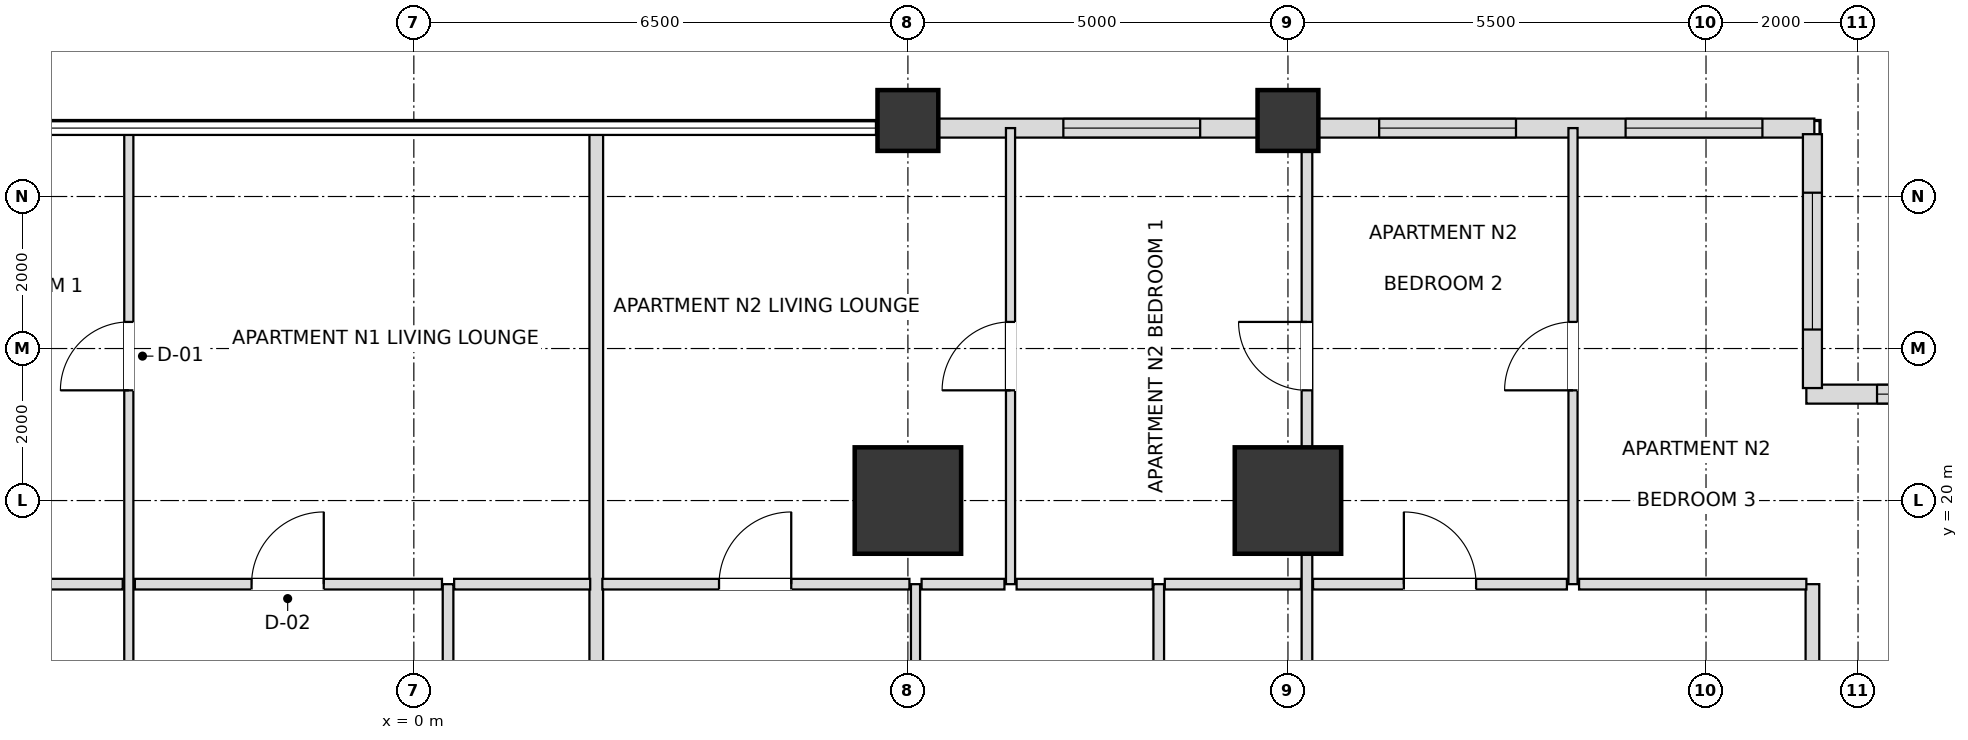
"""IFC4 building model, lengths in metres.
Left out: names, types, materials, properties, quantities, classifications, styles, units other than length and angle.
Written with IfcOpenShell. Run it as: python <this file> out.ifc"""

import sys

from ifc_helpers import new_model, si_unit, direction, frame, frame_2d, origin, origin_2d, place, context, subcontext, project, spatial, rectangle, extrude, element, fill, save


model = new_model("IFC4")
c1 = context("Model", 3, precision=1e-05, world=origin(), true_north=direction((0.0, 1.0)))
c2 = subcontext(c1, "Body", "Model", "MODEL_VIEW")
j1 = project(units=[si_unit("LENGTHUNIT", "METRE"), si_unit("PLANEANGLEUNIT", "RADIAN")], contexts=[c1])
p1 = place(None, origin())
s1 = spatial("IfcSite", under=j1, at=p1, CompositionType="ELEMENT")
p2 = place(p1, origin())
s2 = spatial("IfcBuilding", under=s1, at=p2, CompositionType="ELEMENT")
p3 = place(p2, frame((0.0, 0.0, 64.8)))
s3 = spatial("IfcBuildingStorey", under=s2, at=p3, CompositionType="ELEMENT", Elevation=64.8)
for number, where, z_axis, x_axis in (
    (1, (11.5, 20.0, 0.0), (0.0, 0.0, 1.0), (1.0, 0.0, 0.0)),
    (2, (6.5, 20.0, 0.0), (0.0, 0.0, 1.0), (1.0, 0.0, 0.0)),
):
    element("IfcColumn", number, at=place(p3, frame(where, z_axis=z_axis, x_axis=x_axis)), inside=s3, PredefinedType="USERDEFINED", context=c2, shape_type="SweptSolid", body=[
        extrude(rectangle(XDim=1.4, YDim=1.4, at=origin_2d()), origin(), (0.0, 0.0, 1.0), 3.6),
    ])
for number, where, z_axis, x_axis in (
    (3, (6.5, 25.0, 0.0), (0.0, 0.0, 1.0), (1.0, 0.0, 0.0)),
    (4, (11.5, 25.0, 0.0), (0.0, 0.0, 1.0), (1.0, 0.0, 0.0)),
):
    element("IfcColumn", number, at=place(p3, frame(where, z_axis=z_axis, x_axis=x_axis)), inside=s3, PredefinedType="COLUMN", context=c2, shape_type="SweptSolid", body=[
        extrude(rectangle(XDim=0.8, YDim=0.8, at=origin_2d()), origin(), (0.0, 0.0, 1.0), 3.6),
    ])
p4 = place(p3, frame((18.425, 24.9, 0.0), z_axis=(0.0, 0.0, 1.0), x_axis=(-1.0, 0.0, 0.0)))
e5 = element("IfcWall", 5, at=p4, inside=s3, PredefinedType="SOLIDWALL", context=c2, shape_type="SweptSolid", body=[
    extrude(rectangle(XDim=6.53, YDim=0.25, at=frame_2d((3.265, 0.0))), origin(), (0.0, 0.0, 1.0), 2.736),
])
p5 = place(p4, frame((0.683, 0.0, 0.72)))
e6 = element("IfcOpeningElement", 6, at=p5, cuts=e5, PredefinedType="OPENING", context=c2, shape_type="SweptSolid", body=[
    extrude(rectangle(XDim=1.8, YDim=1.68, at=frame_2d((0.9, 0.84))), frame((0.0, 0.135, 0.0), z_axis=(0.0, -1.0, 0.0), x_axis=(1.0, 0.0, 0.0)), (0.0, 0.0, 1.0), 0.27),
])
p6 = place(p4, frame((3.925, 0.0, 0.72)))
e7 = element("IfcOpeningElement", 7, at=p6, cuts=e5, PredefinedType="OPENING", context=c2, shape_type="SweptSolid", body=[
    extrude(rectangle(XDim=1.8, YDim=1.68, at=frame_2d((0.9, 0.84))), frame((0.0, 0.135, 0.0), z_axis=(0.0, -1.0, 0.0), x_axis=(1.0, 0.0, 0.0)), (0.0, 0.0, 1.0), 0.27),
])
p7 = place(p3, frame((11.105, 24.9, 0.0), z_axis=(0.0, 0.0, 1.0), x_axis=(-1.0, 0.0, 0.0)))
e8 = element("IfcWall", 8, at=p7, inside=s3, PredefinedType="SOLIDWALL", context=c2, shape_type="SweptSolid", body=[
    extrude(rectangle(XDim=4.21, YDim=0.25, at=frame_2d((2.105, 0.0))), origin(), (0.0, 0.0, 1.0), 2.736),
])
p8 = place(p7, frame((0.76, 0.0, 0.72)))
e9 = element("IfcOpeningElement", 9, at=p8, cuts=e8, PredefinedType="OPENING", context=c2, shape_type="SweptSolid", body=[
    extrude(rectangle(XDim=1.8, YDim=1.68, at=frame_2d((0.9, 0.84))), frame((0.0, 0.135, 0.0), z_axis=(0.0, -1.0, 0.0), x_axis=(1.0, 0.0, 0.0)), (0.0, 0.0, 1.0), 0.27),
])
p9 = place(p3, frame((21.98, 21.4, 0.0), z_axis=(0.0, 0.0, 1.0), x_axis=(-1.0, 0.0, 0.0)))
e10 = element("IfcWall", 10, at=p9, inside=s3, PredefinedType="SOLIDWALL", context=c2, shape_type="SweptSolid", body=[
    extrude(rectangle(XDim=3.66, YDim=0.25, at=frame_2d((1.83, 0.0))), origin(), (0.0, 0.0, 1.0), 2.736),
])
p10 = place(p9, frame((0.93, 0.0, 0.72)))
e11 = element("IfcOpeningElement", 11, at=p10, cuts=e10, PredefinedType="OPENING", context=c2, shape_type="SweptSolid", body=[
    extrude(rectangle(XDim=1.8, YDim=1.68, at=frame_2d((0.9, 0.84))), frame((0.0, 0.135, 0.0), z_axis=(0.0, -1.0, 0.0), x_axis=(1.0, 0.0, 0.0)), (0.0, 0.0, 1.0), 0.27),
])
p11 = place(p3, frame((18.4, 21.48, 0.0), z_axis=(0.0, 0.0, 1.0), x_axis=(0.0, 1.0, 0.0)))
e12 = element("IfcWall", 12, at=p11, inside=s3, PredefinedType="SOLIDWALL", context=c2, shape_type="SweptSolid", body=[
    extrude(rectangle(XDim=3.34, YDim=0.25, at=frame_2d((1.67, 0.0))), origin(), (0.0, 0.0, 1.0), 2.736),
])
p12 = place(p11, frame((0.77, 0.0, 0.72)))
e13 = element("IfcOpeningElement", 13, at=p12, cuts=e12, PredefinedType="OPENING", context=c2, shape_type="SweptSolid", body=[
    extrude(rectangle(XDim=1.8, YDim=1.68, at=frame_2d((0.9, 0.84))), frame((0.0, 0.135, 0.0), z_axis=(0.0, -1.0, 0.0), x_axis=(1.0, 0.0, 0.0)), (0.0, 0.0, 1.0), 0.27),
])
p13 = place(p3, frame((-3.75, 9.3, 0.0), z_axis=(0.0, 0.0, 1.0), x_axis=(0.0, 1.0, 0.0)))
e14 = element("IfcWall", 14, at=p13, inside=s3, PredefinedType="PARTITIONING", context=c2, shape_type="SweptSolid", body=[
    extrude(rectangle(XDim=15.6, YDim=0.12, at=frame_2d((7.8, 0.0))), origin(), (0.0, 0.0, 1.0), 2.816),
])
p14 = place(p13, frame((4.325, 0.0, 0.0)))
e15 = element("IfcOpeningElement", 15, at=p14, cuts=e14, PredefinedType="OPENING", context=c2, shape_type="SweptSolid", body=[
    extrude(rectangle(XDim=0.95, YDim=2.1, at=frame_2d((0.475, 1.05))), frame((0.0, 0.07, 0.0), z_axis=(0.0, -1.0, 0.0), x_axis=(1.0, 0.0, 0.0)), (0.0, 0.0, 1.0), 0.14),
])
p15 = place(p13, frame((12.15, 0.0, 0.0)))
e16 = element("IfcOpeningElement", 16, at=p15, cuts=e14, PredefinedType="OPENING", context=c2, shape_type="SweptSolid", body=[
    extrude(rectangle(XDim=0.9, YDim=2.1, at=frame_2d((0.45, 1.05))), frame((0.0, 0.07, 0.0), z_axis=(0.0, -1.0, 0.0), x_axis=(1.0, 0.0, 0.0)), (0.0, 0.0, 1.0), 0.14),
])
p16 = place(p3, frame((0.45, 9.3, 0.0), z_axis=(0.0, 0.0, 1.0), x_axis=(0.0, 1.0, 0.0)))
e17 = element("IfcWall", 17, at=p16, inside=s3, PredefinedType="PARTITIONING", context=c2, shape_type="SweptSolid", body=[
    extrude(rectangle(XDim=9.6, YDim=0.14, at=frame_2d((4.8, 0.0))), origin(), (0.0, 0.0, 1.0), 2.948),
])
p17 = place(p16, frame((4.35, 0.0, 0.0)))
e18 = element("IfcOpeningElement", 18, at=p17, cuts=e17, PredefinedType="OPENING", context=c2, shape_type="SweptSolid", body=[
    extrude(rectangle(XDim=0.9, YDim=2.1, at=frame_2d((0.45, 1.05))), frame((0.0, 0.08, 0.0), z_axis=(0.0, -1.0, 0.0), x_axis=(1.0, 0.0, 0.0)), (0.0, 0.0, 1.0), 0.16),
])
p18 = place(p3, frame((2.4, 9.3, 0.0), z_axis=(0.0, 0.0, 1.0), x_axis=(0.0, 1.0, 0.0)))
e19 = element("IfcWall", 19, at=p18, inside=s3, PredefinedType="PARTITIONING", context=c2, shape_type="SweptSolid", body=[
    extrude(rectangle(XDim=15.6, YDim=0.18, at=frame_2d((7.8, 0.0))), origin(), (0.0, 0.0, 1.0), 2.816),
])
p19 = place(p3, frame((6.6, 9.3, 0.0), z_axis=(0.0, 0.0, 1.0), x_axis=(0.0, 1.0, 0.0)))
e20 = element("IfcWall", 20, at=p19, inside=s3, PredefinedType="PARTITIONING", context=c2, shape_type="SweptSolid", body=[
    extrude(rectangle(XDim=9.6, YDim=0.12, at=frame_2d((4.8, 0.0))), origin(), (0.0, 0.0, 1.0), 2.816),
])
p20 = place(p19, frame((4.325, 0.0, 0.0)))
e21 = element("IfcOpeningElement", 21, at=p20, cuts=e20, PredefinedType="OPENING", context=c2, shape_type="SweptSolid", body=[
    extrude(rectangle(XDim=0.95, YDim=2.1, at=frame_2d((0.475, 1.05))), frame((0.0, 0.07, 0.0), z_axis=(0.0, -1.0, 0.0), x_axis=(1.0, 0.0, 0.0)), (0.0, 0.0, 1.0), 0.14),
])
p21 = place(p3, frame((7.85, 18.9, 0.0), z_axis=(0.0, 0.0, 1.0), x_axis=(0.0, 1.0, 0.0)))
e22 = element("IfcWall", 22, at=p21, inside=s3, PredefinedType="PARTITIONING", context=c2, shape_type="SweptSolid", body=[
    extrude(rectangle(XDim=6.0, YDim=0.12, at=frame_2d((3.0, 0.0))), origin(), (0.0, 0.0, 1.0), 2.816),
])
p22 = place(p21, frame((2.55, 0.0, 0.0)))
e23 = element("IfcOpeningElement", 23, at=p22, cuts=e22, PredefinedType="OPENING", context=c2, shape_type="SweptSolid", body=[
    extrude(rectangle(XDim=0.9, YDim=2.1, at=frame_2d((0.45, 1.05))), frame((0.0, 0.07, 0.0), z_axis=(0.0, -1.0, 0.0), x_axis=(1.0, 0.0, 0.0)), (0.0, 0.0, 1.0), 0.14),
])
p23 = place(p3, frame((9.8, 9.3, 0.0), z_axis=(0.0, 0.0, 1.0), x_axis=(0.0, 1.0, 0.0)))
e24 = element("IfcWall", 24, at=p23, inside=s3, PredefinedType="PARTITIONING", context=c2, shape_type="SweptSolid", body=[
    extrude(rectangle(XDim=9.6, YDim=0.14, at=frame_2d((4.8, 0.0))), origin(), (0.0, 0.0, 1.0), 2.816),
])
p24 = place(p23, frame((4.35, 0.0, 0.0)))
e25 = element("IfcOpeningElement", 25, at=p24, cuts=e24, PredefinedType="OPENING", context=c2, shape_type="SweptSolid", body=[
    extrude(rectangle(XDim=0.9, YDim=2.1, at=frame_2d((0.45, 1.05))), frame((0.0, 0.08, 0.0), z_axis=(0.0, -1.0, 0.0), x_axis=(1.0, 0.0, 0.0)), (0.0, 0.0, 1.0), 0.16),
])
p25 = place(p3, frame((11.75, 9.3, 0.0), z_axis=(0.0, 0.0, 1.0), x_axis=(0.0, 1.0, 0.0)))
e26 = element("IfcWall", 26, at=p25, inside=s3, PredefinedType="PARTITIONING", context=c2, shape_type="SweptSolid", body=[
    extrude(rectangle(XDim=15.6, YDim=0.14, at=frame_2d((7.8, 0.0))), origin(), (0.0, 0.0, 1.0), 2.736),
])
p26 = place(p25, frame((12.15, 0.0, 0.0)))
e27 = element("IfcOpeningElement", 27, at=p26, cuts=e26, PredefinedType="OPENING", context=c2, shape_type="SweptSolid", body=[
    extrude(rectangle(XDim=0.9, YDim=2.1, at=frame_2d((0.45, 1.05))), frame((0.0, 0.08, 0.0), z_axis=(0.0, -1.0, 0.0), x_axis=(1.0, 0.0, 0.0)), (0.0, 0.0, 1.0), 0.16),
])
p27 = place(p3, frame((15.25, 18.9, 0.0), z_axis=(0.0, 0.0, 1.0), x_axis=(0.0, 1.0, 0.0)))
e28 = element("IfcWall", 28, at=p27, inside=s3, PredefinedType="PARTITIONING", context=c2, shape_type="SweptSolid", body=[
    extrude(rectangle(XDim=6.0, YDim=0.12, at=frame_2d((3.0, 0.0))), origin(), (0.0, 0.0, 1.0), 2.736),
])
p28 = place(p27, frame((2.55, 0.0, 0.0)))
e29 = element("IfcOpeningElement", 29, at=p28, cuts=e28, PredefinedType="OPENING", context=c2, shape_type="SweptSolid", body=[
    extrude(rectangle(XDim=0.9, YDim=2.1, at=frame_2d((0.45, 1.05))), frame((0.0, 0.07, 0.0), z_axis=(0.0, -1.0, 0.0), x_axis=(1.0, 0.0, 0.0)), (0.0, 0.0, 1.0), 0.14),
])
p29 = place(p3, frame((18.4, 9.3, 0.0), z_axis=(0.0, 0.0, 1.0), x_axis=(0.0, 1.0, 0.0)))
e30 = element("IfcWall", 30, at=p29, inside=s3, PredefinedType="PARTITIONING", context=c2, shape_type="SweptSolid", body=[
    extrude(rectangle(XDim=9.6, YDim=0.18, at=frame_2d((4.8, 0.0))), origin(), (0.0, 0.0, 1.0), 2.736),
])
p30 = place(p3, frame((-6.87, 18.9, 0.0), z_axis=(0.0, 0.0, 1.0), x_axis=(1.0, 0.0, 0.0)))
e31 = element("IfcWall", 31, at=p30, inside=s3, PredefinedType="PARTITIONING", context=c2, shape_type="SweptSolid", body=[
    extrude(rectangle(XDim=3.04, YDim=0.14, at=frame_2d((1.52, 0.0))), origin(), (0.0, 0.0, 1.0), 2.816),
])
p31 = place(p3, frame((-3.67, 18.9, 0.0), z_axis=(0.0, 0.0, 1.0), x_axis=(1.0, 0.0, 0.0)))
e32 = element("IfcWall", 32, at=p31, inside=s3, PredefinedType="PARTITIONING", context=c2, shape_type="SweptSolid", body=[
    extrude(rectangle(XDim=4.04, YDim=0.14, at=frame_2d((2.02, 0.0))), origin(), (0.0, 0.0, 1.0), 3.38),
])
p32 = place(p31, frame((1.535, 0.0, 0.0)))
e33 = element("IfcOpeningElement", 33, at=p32, cuts=e32, PredefinedType="OPENING", context=c2, shape_type="SweptSolid", body=[
    extrude(rectangle(XDim=0.95, YDim=2.1, at=frame_2d((0.475, 1.05))), frame((0.0, 0.08, 0.0), z_axis=(0.0, -1.0, 0.0), x_axis=(1.0, 0.0, 0.0)), (0.0, 0.0, 1.0), 0.16),
])
p33 = place(p3, frame((0.53, 18.9, 0.0), z_axis=(0.0, 0.0, 1.0), x_axis=(1.0, 0.0, 0.0)))
e34 = element("IfcWall", 34, at=p33, inside=s3, PredefinedType="PARTITIONING", context=c2, shape_type="SweptSolid", body=[
    extrude(rectangle(XDim=1.79, YDim=0.14, at=frame_2d((0.895, 0.0))), origin(), (0.0, 0.0, 1.0), 3.38),
])
p34 = place(p3, frame((2.48, 18.9, 0.0), z_axis=(0.0, 0.0, 1.0), x_axis=(1.0, 0.0, 0.0)))
e35 = element("IfcWall", 35, at=p34, inside=s3, PredefinedType="PARTITIONING", context=c2, shape_type="SweptSolid", body=[
    extrude(rectangle(XDim=4.04, YDim=0.14, at=frame_2d((2.02, 0.0))), origin(), (0.0, 0.0, 1.0), 3.38),
])
p35 = place(p34, frame((1.535, 0.0, 0.0)))
e36 = element("IfcOpeningElement", 36, at=p35, cuts=e35, PredefinedType="OPENING", context=c2, shape_type="SweptSolid", body=[
    extrude(rectangle(XDim=0.95, YDim=2.1, at=frame_2d((0.475, 1.05))), frame((0.0, 0.08, 0.0), z_axis=(0.0, -1.0, 0.0), x_axis=(1.0, 0.0, 0.0)), (0.0, 0.0, 1.0), 0.16),
])
p36 = place(p3, frame((6.68, 18.9, 0.0), z_axis=(0.0, 0.0, 1.0), x_axis=(1.0, 0.0, 0.0)))
e37 = element("IfcWall", 37, at=p36, inside=s3, PredefinedType="PARTITIONING", context=c2, shape_type="SweptSolid", body=[
    extrude(rectangle(XDim=1.09, YDim=0.14, at=frame_2d((0.545, 0.0))), origin(), (0.0, 0.0, 1.0), 3.38),
])
p37 = place(p3, frame((7.93, 18.9, 0.0), z_axis=(0.0, 0.0, 1.0), x_axis=(1.0, 0.0, 0.0)))
e38 = element("IfcWall", 38, at=p37, inside=s3, PredefinedType="PARTITIONING", context=c2, shape_type="SweptSolid", body=[
    extrude(rectangle(XDim=1.79, YDim=0.14, at=frame_2d((0.895, 0.0))), origin(), (0.0, 0.0, 1.0), 3.38),
])
p38 = place(p3, frame((9.88, 18.9, 0.0), z_axis=(0.0, 0.0, 1.0), x_axis=(1.0, 0.0, 0.0)))
e39 = element("IfcWall", 39, at=p38, inside=s3, PredefinedType="PARTITIONING", context=c2, shape_type="SweptSolid", body=[
    extrude(rectangle(XDim=1.79, YDim=0.14, at=frame_2d((0.895, 0.0))), origin(), (0.0, 0.0, 1.0), 2.736),
])
p39 = place(p3, frame((11.83, 18.9, 0.0), z_axis=(0.0, 0.0, 1.0), x_axis=(1.0, 0.0, 0.0)))
e40 = element("IfcWall", 40, at=p39, inside=s3, PredefinedType="PARTITIONING", context=c2, shape_type="SweptSolid", body=[
    extrude(rectangle(XDim=3.34, YDim=0.14, at=frame_2d((1.67, 0.0))), origin(), (0.0, 0.0, 1.0), 2.736),
])
p40 = place(p39, frame((1.195, 0.0, 0.0)))
e41 = element("IfcOpeningElement", 41, at=p40, cuts=e40, PredefinedType="OPENING", context=c2, shape_type="SweptSolid", body=[
    extrude(rectangle(XDim=0.95, YDim=2.1, at=frame_2d((0.475, 1.05))), frame((0.0, 0.08, 0.0), z_axis=(0.0, -1.0, 0.0), x_axis=(1.0, 0.0, 0.0)), (0.0, 0.0, 1.0), 0.16),
])
p41 = place(p3, frame((15.33, 18.9, 0.0), z_axis=(0.0, 0.0, 1.0), x_axis=(1.0, 0.0, 0.0)))
e42 = element("IfcWall", 42, at=p41, inside=s3, PredefinedType="PARTITIONING", context=c2, shape_type="SweptSolid", body=[
    extrude(rectangle(XDim=2.99, YDim=0.14, at=frame_2d((1.495, 0.0))), origin(), (0.0, 0.0, 1.0), 2.736),
])
p42 = place(p5, origin())
e43 = element("IfcWindow", 43, at=p42, inside=s3, PartitioningType="SINGLE_PANEL", PredefinedType="WINDOW", context=c2, shape_type="SweptSolid", body=[
    extrude(rectangle(XDim=1.8, YDim=1.68, at=frame_2d((0.9, 0.84))), frame((0.0, 0.03, 0.0), z_axis=(0.0, -1.0, 0.0), x_axis=(1.0, 0.0, 0.0)), (0.0, 0.0, 1.0), 0.06),
])
fill(e6, e43)
p43 = place(p6, origin())
e44 = element("IfcWindow", 44, at=p43, inside=s3, PartitioningType="SINGLE_PANEL", PredefinedType="WINDOW", context=c2, shape_type="SweptSolid", body=[
    extrude(rectangle(XDim=1.8, YDim=1.68, at=frame_2d((0.9, 0.84))), frame((0.0, 0.03, 0.0), z_axis=(0.0, -1.0, 0.0), x_axis=(1.0, 0.0, 0.0)), (0.0, 0.0, 1.0), 0.06),
])
fill(e7, e44)
p44 = place(p8, origin())
e45 = element("IfcWindow", 45, at=p44, inside=s3, PartitioningType="SINGLE_PANEL", PredefinedType="WINDOW", context=c2, shape_type="SweptSolid", body=[
    extrude(rectangle(XDim=1.8, YDim=1.68, at=frame_2d((0.9, 0.84))), frame((0.0, 0.03, 0.0), z_axis=(0.0, -1.0, 0.0), x_axis=(1.0, 0.0, 0.0)), (0.0, 0.0, 1.0), 0.06),
])
fill(e9, e45)
p45 = place(p10, origin())
e46 = element("IfcWindow", 46, at=p45, inside=s3, PartitioningType="SINGLE_PANEL", PredefinedType="WINDOW", context=c2, shape_type="SweptSolid", body=[
    extrude(rectangle(XDim=1.8, YDim=1.68, at=frame_2d((0.9, 0.84))), frame((0.0, 0.03, 0.0), z_axis=(0.0, -1.0, 0.0), x_axis=(1.0, 0.0, 0.0)), (0.0, 0.0, 1.0), 0.06),
])
fill(e11, e46)
p46 = place(p12, origin())
e47 = element("IfcWindow", 47, at=p46, inside=s3, PartitioningType="SINGLE_PANEL", PredefinedType="WINDOW", context=c2, shape_type="SweptSolid", body=[
    extrude(rectangle(XDim=1.8, YDim=1.68, at=frame_2d((0.9, 0.84))), frame((0.0, 0.03, 0.0), z_axis=(0.0, -1.0, 0.0), x_axis=(1.0, 0.0, 0.0)), (0.0, 0.0, 1.0), 0.06),
])
fill(e13, e47)
p47 = place(p32, origin())
e48 = element("IfcDoor", 48, at=p47, inside=s3, OperationType="SINGLE_SWING_RIGHT", PredefinedType="DOOR", context=c2, shape_type="SweptSolid", body=[
    extrude(rectangle(XDim=0.95, YDim=2.1, at=frame_2d((0.475, 1.05))), frame((0.0, 0.025, 0.0), z_axis=(0.0, -1.0, 0.0), x_axis=(1.0, 0.0, 0.0)), (0.0, 0.0, 1.0), 0.05),
])
fill(e33, e48)
p48 = place(p15, origin())
e49 = element("IfcDoor", 49, at=p48, inside=s3, OperationType="SINGLE_SWING_LEFT", PredefinedType="DOOR", context=c2, shape_type="SweptSolid", body=[
    extrude(rectangle(XDim=0.9, YDim=2.1, at=frame_2d((0.45, 1.05))), frame((0.0, 0.025, 0.0), z_axis=(0.0, -1.0, 0.0), x_axis=(1.0, 0.0, 0.0)), (0.0, 0.0, 1.0), 0.05),
])
fill(e16, e49)
p49 = place(p40, origin())
e50 = element("IfcDoor", 50, at=p49, inside=s3, OperationType="SINGLE_SWING_LEFT", PredefinedType="DOOR", context=c2, shape_type="SweptSolid", body=[
    extrude(rectangle(XDim=0.95, YDim=2.1, at=frame_2d((0.475, 1.05))), frame((0.0, 0.025, 0.0), z_axis=(0.0, -1.0, 0.0), x_axis=(1.0, 0.0, 0.0)), (0.0, 0.0, 1.0), 0.05),
])
fill(e41, e50)
p50 = place(p35, origin())
e51 = element("IfcDoor", 51, at=p50, inside=s3, OperationType="SINGLE_SWING_RIGHT", PredefinedType="DOOR", context=c2, shape_type="SweptSolid", body=[
    extrude(rectangle(XDim=0.95, YDim=2.1, at=frame_2d((0.475, 1.05))), frame((0.0, 0.025, 0.0), z_axis=(0.0, -1.0, 0.0), x_axis=(1.0, 0.0, 0.0)), (0.0, 0.0, 1.0), 0.05),
])
fill(e36, e51)
p51 = place(p22, origin())
e52 = element("IfcDoor", 52, at=p51, inside=s3, OperationType="SINGLE_SWING_LEFT", PredefinedType="DOOR", context=c2, shape_type="SweptSolid", body=[
    extrude(rectangle(XDim=0.9, YDim=2.1, at=frame_2d((0.45, 1.05))), frame((0.0, 0.025, 0.0), z_axis=(0.0, -1.0, 0.0), x_axis=(1.0, 0.0, 0.0)), (0.0, 0.0, 1.0), 0.05),
])
fill(e23, e52)
p52 = place(p26, origin())
e53 = element("IfcDoor", 53, at=p52, inside=s3, OperationType="SINGLE_SWING_RIGHT", PredefinedType="DOOR", context=c2, shape_type="SweptSolid", body=[
    extrude(rectangle(XDim=0.9, YDim=2.1, at=frame_2d((0.45, 1.05))), frame((0.0, 0.025, 0.0), z_axis=(0.0, -1.0, 0.0), x_axis=(1.0, 0.0, 0.0)), (0.0, 0.0, 1.0), 0.05),
])
fill(e27, e53)
p53 = place(p28, origin())
e54 = element("IfcDoor", 54, at=p53, inside=s3, OperationType="SINGLE_SWING_LEFT", PredefinedType="DOOR", context=c2, shape_type="SweptSolid", body=[
    extrude(rectangle(XDim=0.9, YDim=2.1, at=frame_2d((0.45, 1.05))), frame((0.0, 0.025, 0.0), z_axis=(0.0, -1.0, 0.0), x_axis=(1.0, 0.0, 0.0)), (0.0, 0.0, 1.0), 0.05),
])
fill(e29, e54)
save(model, sys.argv[1])
